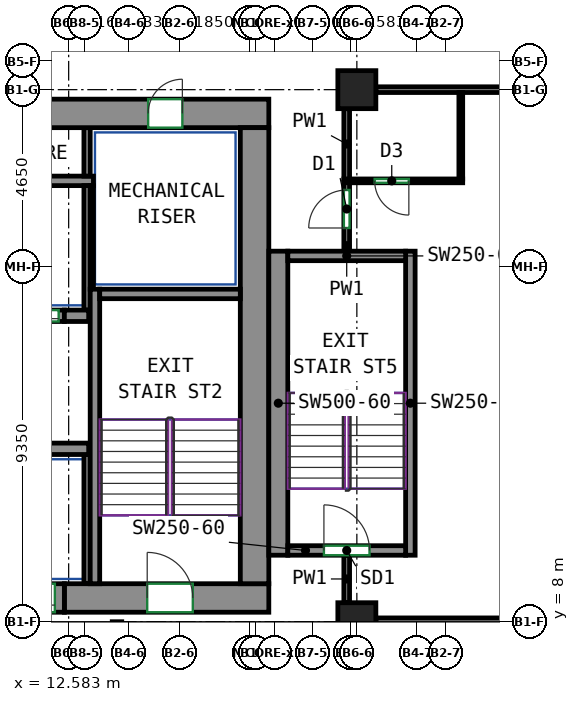
"""IFC4 building model, lengths in metres.
Left out: names, types, materials, properties, quantities, classifications, styles, units other than length and angle.
Written with IfcOpenShell. Run it as: python <this file> out.ifc"""

import sys

from ifc_helpers import new_model, si_unit, direction, frame, frame_2d, origin, origin_2d, place, context, subcontext, project, spatial, rectangle, extrude, source, transform, mapped, element, fill, save


model = new_model("IFC4")
c1 = context("Model", 3, precision=1e-05, world=origin(), true_north=direction((0.0, 1.0)))
c2 = subcontext(c1, "Body", "Model", "MODEL_VIEW")
j1 = project(units=[si_unit("LENGTHUNIT", "METRE"), si_unit("PLANEANGLEUNIT", "RADIAN")], contexts=[c1])
p1 = place(None, origin())
s1 = spatial("IfcSite", under=j1, at=p1, CompositionType="ELEMENT")
p2 = place(p1, origin())
s2 = spatial("IfcBuilding", under=s1, at=p2, CompositionType="ELEMENT")
p3 = place(p2, frame((0.0, 0.0, 216.9)))
s3 = spatial("IfcBuildingStorey", under=s2, at=p3, CompositionType="ELEMENT", Elevation=216.9)
m1 = source(origin(), c2, "Body", "SweptSolid", [
    extrude(rectangle(XDim=1.0, YDim=1.0, at=origin_2d()), origin(), (0.0, 0.0, 1.0), 3.12),
])
for number, where, z_axis, x_axis in (
    (1, (20.167, 8.0, 0.0), (0.0, 0.0, 1.0), (1.0, 0.0, 0.0)),
    (2, (20.167, 22.0, 0.0), (0.0, 0.0, 1.0), (1.0, 0.0, 0.0)),
):
    element("IfcColumn", number, at=place(p3, frame(where, z_axis=z_axis, x_axis=x_axis)), inside=s3, PredefinedType="COLUMN", context=c2, shape_type="MappedRepresentation", body=[
        mapped(m1, transform((0.0, 0.0, 0.0))),
    ])
m2 = source(origin(), c2, "Body", "SweptSolid", [
    extrude(rectangle(XDim=5.38, YDim=0.75, at=frame_2d((2.69, 0.0))), origin(), (0.0, 0.0, 1.0), 3.12),
])
p4 = place(p3, frame((12.47, 8.625, 0.0), z_axis=(0.0, 0.0, 1.0), x_axis=(1.0, 0.0, 0.0)))
e3 = element("IfcWall", 3, at=p4, inside=s3, PredefinedType="SHEAR", context=c2, shape_type="MappedRepresentation", body=[
    mapped(m2, transform((0.0, 0.0, 0.0))),
])
p5 = place(p4, frame((2.18, 0.0, 0.0)))
e4 = element("IfcOpeningElement", 4, at=p5, cuts=e3, PredefinedType="OPENING", context=c2, shape_type="SweptSolid", body=[
    extrude(rectangle(XDim=1.2, YDim=2.1, at=frame_2d((0.6, 1.05))), frame((0.0, 0.385, 0.0), z_axis=(0.0, -1.0, 0.0), x_axis=(1.0, 0.0, 0.0)), (0.0, 0.0, 1.0), 0.77),
])
m3 = source(origin(), c2, "Body", "SweptSolid", [
    extrude(rectangle(XDim=33.6, YDim=0.75, at=frame_2d((16.8, 0.0))), origin(), (0.0, 0.0, 1.0), 3.12),
])
p6 = place(p3, frame((-15.75, 21.375, 0.0), z_axis=(0.0, 0.0, 1.0), x_axis=(1.0, 0.0, 0.0)))
e5 = element("IfcWall", 5, at=p6, inside=s3, PredefinedType="SHEAR", context=c2, shape_type="MappedRepresentation", body=[
    mapped(m3, transform((0.0, 0.0, 0.0))),
])
p7 = place(p6, frame((5.858, 0.0, 0.0)))
e6 = element("IfcOpeningElement", 6, at=p7, cuts=e5, PredefinedType="OPENING", context=c2, shape_type="SweptSolid", body=[
    extrude(rectangle(XDim=0.9, YDim=2.1, at=frame_2d((0.45, 1.05))), frame((0.0, 0.385, 0.0), z_axis=(0.0, -1.0, 0.0), x_axis=(1.0, 0.0, 0.0)), (0.0, 0.0, 1.0), 0.77),
])
p8 = place(p6, frame((10.923, 0.0, 0.0)))
e7 = element("IfcOpeningElement", 7, at=p8, cuts=e5, PredefinedType="OPENING", context=c2, shape_type="SweptSolid", body=[
    extrude(rectangle(XDim=0.9, YDim=2.1, at=frame_2d((0.45, 1.05))), frame((0.0, 0.385, 0.0), z_axis=(0.0, -1.0, 0.0), x_axis=(1.0, 0.0, 0.0)), (0.0, 0.0, 1.0), 0.77),
])
p9 = place(p6, frame((16.055, 0.0, 0.0)))
e8 = element("IfcOpeningElement", 8, at=p9, cuts=e5, PredefinedType="OPENING", context=c2, shape_type="SweptSolid", body=[
    extrude(rectangle(XDim=0.9, YDim=2.1, at=frame_2d((0.45, 1.05))), frame((0.0, 0.385, 0.0), z_axis=(0.0, -1.0, 0.0), x_axis=(1.0, 0.0, 0.0)), (0.0, 0.0, 1.0), 0.77),
])
p10 = place(p6, frame((20.879, 0.0, 0.0)))
e9 = element("IfcOpeningElement", 9, at=p10, cuts=e5, PredefinedType="OPENING", context=c2, shape_type="SweptSolid", body=[
    extrude(rectangle(XDim=0.9, YDim=2.1, at=frame_2d((0.45, 1.05))), frame((0.0, 0.385, 0.0), z_axis=(0.0, -1.0, 0.0), x_axis=(1.0, 0.0, 0.0)), (0.0, 0.0, 1.0), 0.77),
])
p11 = place(p6, frame((26.239, 0.0, 0.0)))
e10 = element("IfcOpeningElement", 10, at=p11, cuts=e5, PredefinedType="OPENING", context=c2, shape_type="SweptSolid", body=[
    extrude(rectangle(XDim=0.9, YDim=2.1, at=frame_2d((0.45, 1.05))), frame((0.0, 0.385, 0.0), z_axis=(0.0, -1.0, 0.0), x_axis=(1.0, 0.0, 0.0)), (0.0, 0.0, 1.0), 0.77),
])
p12 = place(p6, frame((2.275, 0.0, 0.0)))
e11 = element("IfcOpeningElement", 11, at=p12, cuts=e5, PredefinedType="OPENING", context=c2, shape_type="SweptSolid", body=[
    extrude(rectangle(XDim=0.9, YDim=2.1, at=frame_2d((0.45, 1.05))), frame((0.0, 0.385, 0.0), z_axis=(0.0, -1.0, 0.0), x_axis=(1.0, 0.0, 0.0)), (0.0, 0.0, 1.0), 0.77),
])
p13 = place(p6, frame((30.425, 0.0, 0.0)))
e12 = element("IfcOpeningElement", 12, at=p13, cuts=e5, PredefinedType="OPENING", context=c2, shape_type="SweptSolid", body=[
    extrude(rectangle(XDim=0.9, YDim=2.1, at=frame_2d((0.45, 1.05))), frame((0.0, 0.385, 0.0), z_axis=(0.0, -1.0, 0.0), x_axis=(1.0, 0.0, 0.0)), (0.0, 0.0, 1.0), 0.77),
])
m4 = source(origin(), c2, "Body", "SweptSolid", [
    extrude(rectangle(XDim=12.0, YDim=0.75, at=frame_2d((6.0, 0.0))), origin(), (0.0, 0.0, 1.0), 3.12),
])
p14 = place(p3, frame((17.475, 9.0, 0.0), z_axis=(0.0, 0.0, 1.0), x_axis=(0.0, 1.0, 0.0)))
e13 = element("IfcWall", 13, at=p14, inside=s3, PredefinedType="SHEAR", context=c2, shape_type="MappedRepresentation", body=[
    mapped(m4, transform((0.0, 0.0, 0.0))),
])
m5 = source(origin(), c2, "Body", "SweptSolid", [
    extrude(rectangle(XDim=7.75, YDim=0.25, at=frame_2d((3.875, 0.0))), origin(), (0.0, 0.0, 1.0), 3.12),
])
p15 = place(p3, frame((13.275, 9.0, 0.0), z_axis=(0.0, 0.0, 1.0), x_axis=(0.0, 1.0, 0.0)))
e14 = element("IfcWall", 14, at=p15, inside=s3, PredefinedType="SHEAR", context=c2, shape_type="MappedRepresentation", body=[
    mapped(m5, transform((0.0, 0.0, 0.0))),
])
m6 = source(origin(), c2, "Body", "SweptSolid", [
    extrude(rectangle(XDim=3.7, YDim=0.25, at=frame_2d((1.85, 0.0))), origin(), (0.0, 0.0, 1.0), 3.12),
])
p16 = place(p3, frame((13.4, 16.625, 0.0), z_axis=(0.0, 0.0, 1.0), x_axis=(1.0, 0.0, 0.0)))
e15 = element("IfcWall", 15, at=p16, inside=s3, PredefinedType="SHEAR", context=c2, shape_type="MappedRepresentation", body=[
    mapped(m6, transform((0.0, 0.0, 0.0))),
])
m7 = source(origin(), c2, "Body", "SweptSolid", [
    extrude(rectangle(XDim=8.0, YDim=0.5, at=frame_2d((4.0, 0.0))), origin(), (0.0, 0.0, 1.0), 3.12),
])
p17 = place(p3, frame((18.1, 9.75, 0.0), z_axis=(0.0, 0.0, 1.0), x_axis=(0.0, 1.0, 0.0)))
e16 = element("IfcWall", 16, at=p17, inside=s3, PredefinedType="SHEAR", context=c2, shape_type="MappedRepresentation", body=[
    mapped(m7, transform((0.0, 0.0, 0.0))),
])
m8 = source(origin(), c2, "Body", "SweptSolid", [
    extrude(rectangle(XDim=8.0, YDim=0.25, at=frame_2d((4.0, 0.0))), origin(), (0.0, 0.0, 1.0), 3.12),
])
p18 = place(p3, frame((21.575, 9.75, 0.0), z_axis=(0.0, 0.0, 1.0), x_axis=(0.0, 1.0, 0.0)))
e17 = element("IfcWall", 17, at=p18, inside=s3, PredefinedType="SHEAR", context=c2, shape_type="MappedRepresentation", body=[
    mapped(m8, transform((0.0, 0.0, 0.0))),
])
m9 = source(origin(), c2, "Body", "SweptSolid", [
    extrude(rectangle(XDim=3.1, YDim=0.25, at=frame_2d((1.55, 0.0))), origin(), (0.0, 0.0, 1.0), 3.12),
])
p19 = place(p3, frame((18.35, 9.875, 0.0), z_axis=(0.0, 0.0, 1.0), x_axis=(1.0, 0.0, 0.0)))
e18 = element("IfcWall", 18, at=p19, inside=s3, PredefinedType="SHEAR", context=c2, shape_type="MappedRepresentation", body=[
    mapped(m9, transform((0.0, 0.0, 0.0))),
])
p20 = place(p19, frame((0.95, 0.0, 0.0)))
e19 = element("IfcOpeningElement", 19, at=p20, cuts=e18, PredefinedType="OPENING", context=c2, shape_type="SweptSolid", body=[
    extrude(rectangle(XDim=1.2, YDim=2.1, at=frame_2d((0.6, 1.05))), frame((0.0, 0.135, 0.0), z_axis=(0.0, -1.0, 0.0), x_axis=(1.0, 0.0, 0.0)), (0.0, 0.0, 1.0), 0.27),
])
p21 = place(p3, frame((18.35, 17.625, 0.0), z_axis=(0.0, 0.0, 1.0), x_axis=(1.0, 0.0, 0.0)))
e20 = element("IfcWall", 20, at=p21, inside=s3, PredefinedType="SHEAR", context=c2, shape_type="MappedRepresentation", body=[
    mapped(m9, transform((0.0, 0.0, 0.0))),
])
m10 = source(origin(), c2, "Body", "SweptSolid", [
    extrude(rectangle(XDim=2.82, YDim=0.3, at=frame_2d((1.41, 0.0))), origin(), (0.0, 0.0, 1.0), 3.12),
])
p22 = place(p3, frame((10.29, 12.55, 0.0), z_axis=(0.0, 0.0, 1.0), x_axis=(1.0, 0.0, 0.0)))
e21 = element("IfcWall", 21, at=p22, inside=s3, PredefinedType="SHEAR", context=c2, shape_type="MappedRepresentation", body=[
    mapped(m10, transform((0.0, 0.0, 0.0))),
])
m11 = source(origin(), c2, "Body", "SweptSolid", [
    extrude(rectangle(XDim=0.64, YDim=0.3, at=frame_2d((0.32, 0.0))), origin(), (0.0, 0.0, 1.0), 3.12),
])
p23 = place(p3, frame((12.47, 16.05, 0.0), z_axis=(0.0, 0.0, 1.0), x_axis=(1.0, 0.0, 0.0)))
e22 = element("IfcWall", 22, at=p23, inside=s3, PredefinedType="SHEAR", context=c2, shape_type="MappedRepresentation", body=[
    mapped(m11, transform((0.0, 0.0, 0.0))),
])
m12 = source(origin(), c2, "Body", "SweptSolid", [
    extrude(rectangle(XDim=1.4, YDim=0.3, at=frame_2d((0.7, 0.0))), origin(), (0.0, 0.0, 1.0), 3.12),
])
p24 = place(p3, frame((11.07, 16.05, 0.0), z_axis=(0.0, 0.0, 1.0), x_axis=(1.0, 0.0, 0.0)))
e23 = element("IfcWall", 23, at=p24, inside=s3, PredefinedType="PARTITIONING", context=c2, shape_type="MappedRepresentation", body=[
    mapped(m12, transform((0.0, 0.0, 0.0))),
])
p25 = place(p24, frame((0.15, 0.0, 0.0)))
e24 = element("IfcOpeningElement", 24, at=p25, cuts=e23, PredefinedType="OPENING", context=c2, shape_type="SweptSolid", body=[
    extrude(rectangle(XDim=1.1, YDim=2.1, at=frame_2d((0.55, 1.05))), frame((0.0, 0.16, 0.0), z_axis=(0.0, -1.0, 0.0), x_axis=(1.0, 0.0, 0.0)), (0.0, 0.0, 1.0), 0.32),
])
m13 = source(origin(), c2, "Body", "SweptSolid", [
    extrude(rectangle(XDim=10.97, YDim=0.25, at=frame_2d((5.485, 0.0))), origin(), (0.0, 0.0, 1.0), 3.12),
])
p26 = place(p3, frame((2.265, 19.6, 0.0), z_axis=(0.0, 0.0, 1.0), x_axis=(1.0, 0.0, 0.0)))
e25 = element("IfcWall", 25, at=p26, inside=s3, PredefinedType="PARTITIONING", context=c2, shape_type="MappedRepresentation", body=[
    mapped(m13, transform((0.0, 0.0, 0.0))),
])
m14 = source(origin(), c2, "Body", "SweptSolid", [
    extrude(rectangle(XDim=3.275, YDim=0.165, at=frame_2d((1.638, 0.0))), origin(), (0.0, 0.0, 1.0), 3.12),
])
p27 = place(p3, frame((13.067, 16.2, 0.0), z_axis=(0.0, 0.0, 1.0), x_axis=(0.0, 1.0, 0.0)))
e26 = element("IfcWall", 26, at=p27, inside=s3, PredefinedType="PARTITIONING", context=c2, shape_type="MappedRepresentation", body=[
    mapped(m14, transform((0.0, 0.0, 0.0))),
])
m15 = source(origin(), c2, "Body", "SweptSolid", [
    extrude(rectangle(XDim=1.275, YDim=0.165, at=frame_2d((0.637, 0.0))), origin(), (0.0, 0.0, 1.0), 3.12),
])
p28 = place(p3, frame((13.067, 19.725, 0.0), z_axis=(0.0, 0.0, 1.0), x_axis=(0.0, 1.0, 0.0)))
e27 = element("IfcWall", 27, at=p28, inside=s3, PredefinedType="PARTITIONING", context=c2, shape_type="MappedRepresentation", body=[
    mapped(m15, transform((0.0, 0.0, 0.0))),
])
m16 = source(origin(), c2, "Body", "SweptSolid", [
    extrude(rectangle(XDim=2.725, YDim=0.085, at=frame_2d((1.363, 0.0))), origin(), (0.0, 0.0, 1.0), 3.12),
])
p29 = place(p3, frame((13.192, 16.75, 0.0), z_axis=(0.0, 0.0, 1.0), x_axis=(0.0, 1.0, 0.0)))
e28 = element("IfcWall", 28, at=p29, inside=s3, PredefinedType="PARTITIONING", context=c2, shape_type="MappedRepresentation", body=[
    mapped(m16, transform((0.0, 0.0, 0.0))),
])
m17 = source(origin(), c2, "Body", "SweptSolid", [
    extrude(rectangle(XDim=3.4, YDim=0.165, at=frame_2d((1.7, 0.0))), origin(), (0.0, 0.0, 1.0), 3.12),
])
p30 = place(p3, frame((13.067, 9.0, 0.0), z_axis=(0.0, 0.0, 1.0), x_axis=(0.0, 1.0, 0.0)))
e29 = element("IfcWall", 29, at=p30, inside=s3, PredefinedType="PARTITIONING", context=c2, shape_type="MappedRepresentation", body=[
    mapped(m17, transform((0.0, 0.0, 0.0))),
])
m18 = source(origin(), c2, "Body", "SweptSolid", [
    extrude(rectangle(XDim=1.4, YDim=0.75, at=frame_2d((0.7, 0.0))), origin(), (0.0, 0.0, 1.0), 2.7),
])
p31 = place(p3, frame((11.07, 8.625, 0.0), z_axis=(0.0, 0.0, 1.0), x_axis=(1.0, 0.0, 0.0)))
e30 = element("IfcWall", 30, at=p31, inside=s3, PredefinedType="PARTITIONING", context=c2, shape_type="MappedRepresentation", body=[
    mapped(m18, transform((0.0, 0.0, 0.0))),
])
p32 = place(p31, frame((0.25, 0.0, 0.0)))
e31 = element("IfcOpeningElement", 31, at=p32, cuts=e30, PredefinedType="OPENING", context=c2, shape_type="SweptSolid", body=[
    extrude(rectangle(XDim=0.9, YDim=2.1, at=frame_2d((0.45, 1.05))), frame((0.0, 0.385, 0.0), z_axis=(0.0, -1.0, 0.0), x_axis=(1.0, 0.0, 0.0)), (0.0, 0.0, 1.0), 0.77),
])
p33 = place(p3, frame((19.9, 17.75, 0.0), z_axis=(0.0, 0.0, 1.0), x_axis=(0.0, 1.0, 0.0)))
e32 = element("IfcWall", 32, at=p33, inside=s3, PredefinedType="PARTITIONING", context=c2, shape_type="SweptSolid", body=[
    extrude(rectangle(XDim=1.81, YDim=0.15, at=frame_2d((0.905, 0.0))), origin(), (0.0, 0.0, 1.0), 3.12),
])
p34 = place(p33, frame((0.61, 0.0, 0.0)))
e33 = element("IfcOpeningElement", 33, at=p34, cuts=e32, PredefinedType="OPENING", context=c2, shape_type="SweptSolid", body=[
    extrude(rectangle(XDim=1.0, YDim=2.1, at=frame_2d((0.5, 1.05))), frame((0.0, 0.085, 0.0), z_axis=(0.0, -1.0, 0.0), x_axis=(1.0, 0.0, 0.0)), (0.0, 0.0, 1.0), 0.17),
])
p35 = place(p3, frame((19.9, 8.5, 0.0), z_axis=(0.0, 0.0, 1.0), x_axis=(0.0, 1.0, 0.0)))
e34 = element("IfcWall", 34, at=p35, inside=s3, PredefinedType="PARTITIONING", context=c2, shape_type="SweptSolid", body=[
    extrude(rectangle(XDim=1.25, YDim=0.15, at=frame_2d((0.625, 0.0))), origin(), (0.0, 0.0, 1.0), 3.12),
])
p36 = place(p3, frame((20.667, 22.0, 0.0), z_axis=(0.0, 0.0, 1.0), x_axis=(1.0, 0.0, 0.0)))
e35 = element("IfcWall", 35, at=p36, inside=s3, PredefinedType="PARTITIONING", context=c2, shape_type="SweptSolid", body=[
    extrude(rectangle(XDim=7.158, YDim=0.15, at=frame_2d((3.579, 0.0))), origin(), (0.0, 0.0, 1.0), 3.12),
])
p37 = place(p3, frame((19.9, 19.64, 0.0), z_axis=(0.0, 0.0, 1.0), x_axis=(0.0, 1.0, 0.0)))
e36 = element("IfcWall", 36, at=p37, inside=s3, PredefinedType="PARTITIONING", context=c2, shape_type="SweptSolid", body=[
    extrude(rectangle(XDim=1.86, YDim=0.15, at=frame_2d((0.93, 0.0))), origin(), (0.0, 0.0, 1.0), 3.12),
])
p38 = place(p3, frame((20.667, 8.0, 0.0), z_axis=(0.0, 0.0, 1.0), x_axis=(1.0, 0.0, 0.0)))
e37 = element("IfcWall", 37, at=p38, inside=s3, PredefinedType="PARTITIONING", context=c2, shape_type="SweptSolid", body=[
    extrude(rectangle(XDim=9.758, YDim=0.2, at=frame_2d((4.879, 0.0))), origin(), (0.0, 0.0, 1.0), 2.52),
])
p39 = place(p3, frame((22.952, 19.6, 0.0), z_axis=(0.0, 0.0, 1.0), x_axis=(-1.0, 0.0, 0.0)))
e38 = element("IfcWall", 38, at=p39, inside=s3, PredefinedType="PARTITIONING", context=c2, shape_type="SweptSolid", body=[
    extrude(rectangle(XDim=3.125, YDim=0.1, at=frame_2d((1.562, 0.0))), origin(), (0.0, 0.0, 1.0), 3.12),
])
p40 = place(p39, frame((1.417, 0.0, 0.0)))
e39 = element("IfcOpeningElement", 39, at=p40, cuts=e38, PredefinedType="OPENING", context=c2, shape_type="SweptSolid", body=[
    extrude(rectangle(XDim=0.9, YDim=2.1, at=frame_2d((0.45, 1.05))), frame((0.0, 0.06, 0.0), z_axis=(0.0, -1.0, 0.0), x_axis=(1.0, 0.0, 0.0)), (0.0, 0.0, 1.0), 0.12),
])
p41 = place(p3, frame((22.902, 19.65, 0.0), z_axis=(0.0, 0.0, 1.0), x_axis=(0.0, 1.0, 0.0)))
e40 = element("IfcWall", 40, at=p41, inside=s3, PredefinedType="PARTITIONING", context=c2, shape_type="SweptSolid", body=[
    extrude(rectangle(XDim=2.273, YDim=0.1, at=frame_2d((1.137, 0.0))), origin(), (0.0, 0.0, 1.0), 3.12),
])
p42 = place(p32, origin())
e41 = element("IfcDoor", 41, at=p42, inside=s3, OperationType="SLIDING_TO_LEFT", PredefinedType="DOOR", context=c2, shape_type="SweptSolid", body=[
    extrude(rectangle(XDim=0.9, YDim=2.1, at=frame_2d((0.45, 1.05))), frame((0.0, 0.28, 0.0), z_axis=(0.0, -1.0, 0.0), x_axis=(1.0, 0.0, 0.0)), (0.0, 0.0, 1.0), 0.05),
])
fill(e31, e41)
p43 = place(p25, origin())
e42 = element("IfcDoor", 42, at=p43, inside=s3, OperationType="DOUBLE_DOOR_SLIDING", PredefinedType="DOOR", context=c2, shape_type="SweptSolid", body=[
    extrude(rectangle(XDim=1.1, YDim=2.1, at=frame_2d((0.55, 1.05))), frame((0.0, 0.025, 0.0), z_axis=(0.0, -1.0, 0.0), x_axis=(1.0, 0.0, 0.0)), (0.0, 0.0, 1.0), 0.05),
])
fill(e24, e42)
p44 = place(p13, origin())
e43 = element("IfcDoor", 43, at=p44, inside=s3, OperationType="SINGLE_SWING_RIGHT", PredefinedType="DOOR", context=c2, shape_type="SweptSolid", body=[
    extrude(rectangle(XDim=0.9, YDim=2.1, at=frame_2d((0.45, 1.05))), frame((0.0, -0.23, 0.0), z_axis=(0.0, -1.0, 0.0), x_axis=(1.0, 0.0, 0.0)), (0.0, 0.0, 1.0), 0.05),
])
fill(e12, e43)
p45 = place(p5, origin())
e44 = element("IfcDoor", 44, at=p45, inside=s3, OperationType="DOUBLE_DOOR_SINGLE_SWING", PredefinedType="DOOR", context=c2, shape_type="SweptSolid", body=[
    extrude(rectangle(XDim=1.2, YDim=2.1, at=frame_2d((0.6, 1.05))), frame((0.0, 0.28, 0.0), z_axis=(0.0, -1.0, 0.0), x_axis=(1.0, 0.0, 0.0)), (0.0, 0.0, 1.0), 0.05),
])
fill(e4, e44)
p46 = place(p20, origin())
e45 = element("IfcDoor", 45, at=p46, inside=s3, OperationType="DOUBLE_DOOR_SINGLE_SWING", PredefinedType="DOOR", context=c2, shape_type="SweptSolid", body=[
    extrude(rectangle(XDim=1.2, YDim=2.1, at=frame_2d((0.6, 1.05))), frame((0.0, 0.025, 0.0), z_axis=(0.0, -1.0, 0.0), x_axis=(1.0, 0.0, 0.0)), (0.0, 0.0, 1.0), 0.05),
])
fill(e19, e45)
p47 = place(p34, origin())
e46 = element("IfcDoor", 46, at=p47, inside=s3, OperationType="SINGLE_SWING_LEFT", PredefinedType="DOOR", context=c2, shape_type="SweptSolid", body=[
    extrude(rectangle(XDim=1.0, YDim=2.1, at=frame_2d((0.5, 1.05))), frame((0.0, 0.025, 0.0), z_axis=(0.0, -1.0, 0.0), x_axis=(1.0, 0.0, 0.0)), (0.0, 0.0, 1.0), 0.05),
])
fill(e33, e46)
p48 = place(p40, origin())
e47 = element("IfcDoor", 47, at=p48, inside=s3, OperationType="SINGLE_SWING_LEFT", PredefinedType="DOOR", context=c2, shape_type="SweptSolid", body=[
    extrude(rectangle(XDim=0.9, YDim=2.1, at=frame_2d((0.45, 1.05))), frame((0.0, 0.025, 0.0), z_axis=(0.0, -1.0, 0.0), x_axis=(1.0, 0.0, 0.0)), (0.0, 0.0, 1.0), 0.05),
])
fill(e39, e47)
save(model, sys.argv[1])
